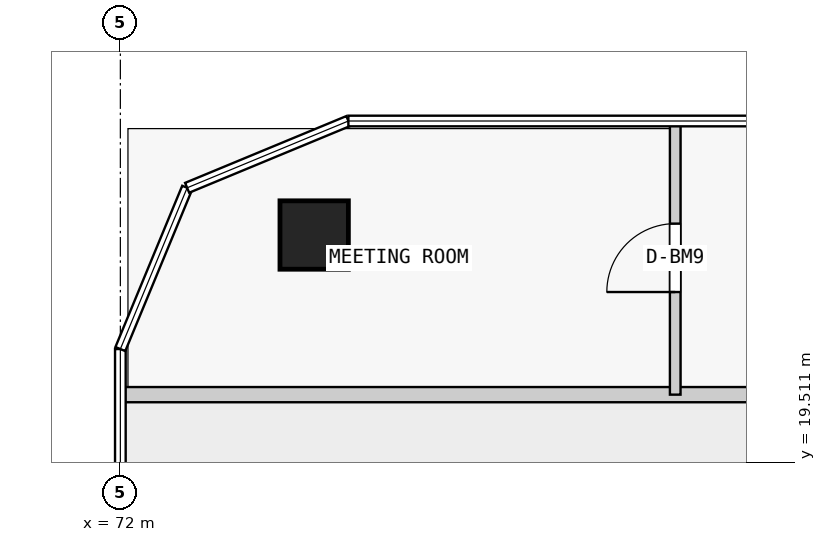
"""IFC4 building model, lengths in metres.
Left out: names, types, materials, properties, quantities, classifications, styles, units other than length and angle.
Written with IfcOpenShell. Run it as: python <this file> out.ifc"""

import sys

from ifc_helpers import new_model, si_unit, direction, frame, frame_2d, origin, origin_2d, place, context, subcontext, project, spatial, rectangle, extrude, element, fill, save


model = new_model("IFC4")
c1 = context("Model", 3, precision=1e-05, world=origin(), true_north=direction((0.0, 1.0)))
c2 = subcontext(c1, "Body", "Model", "MODEL_VIEW")
j1 = project(units=[si_unit("LENGTHUNIT", "METRE"), si_unit("PLANEANGLEUNIT", "RADIAN")], contexts=[c1])
p1 = place(None, origin())
s1 = spatial("IfcSite", under=j1, at=p1, CompositionType="ELEMENT")
p2 = place(p1, origin())
s2 = spatial("IfcBuilding", under=s1, at=p2, CompositionType="ELEMENT")
p3 = place(p2, frame((0.0, 0.0, 88.8)))
s3 = spatial("IfcBuildingStorey", under=s2, at=p3, CompositionType="ELEMENT", Elevation=88.8)
p4 = place(p3, frame((74.55, 22.5, 0.0), z_axis=(0.0, 0.0, 1.0), x_axis=(1.0, 0.0, 0.0)))
e1 = element("IfcColumn", 1, at=p4, inside=s3, PredefinedType="COLUMN", context=c2, shape_type="SweptSolid", body=[
    extrude(rectangle(XDim=0.9, YDim=0.9, at=origin_2d()), origin(), (0.0, 0.0, 1.0), 3.5),
])
p5 = place(p3, frame((72.0, 20.4, 0.0), z_axis=(0.0, 0.0, 1.0), x_axis=(1.0, 0.0, 0.0)))
e2 = element("IfcWall", 2, at=p5, inside=s3, PredefinedType="PARTITIONING", context=c2, shape_type="SweptSolid", body=[
    extrude(rectangle(XDim=20.0, YDim=0.2, at=frame_2d((10.0, 0.0))), origin(), (0.0, 0.0, 1.0), 3.25),
])
p6 = place(p3, frame((79.3, 20.4, 0.0), z_axis=(0.0, 0.0, 1.0), x_axis=(0.0, 1.0, 0.0)))
e3 = element("IfcWall", 3, at=p6, inside=s3, PredefinedType="PARTITIONING", context=c2, shape_type="SweptSolid", body=[
    extrude(rectangle(XDim=3.6, YDim=0.14, at=frame_2d((1.8, 0.0))), origin(), (0.0, 0.0, 1.0), 3.25),
])
p7 = place(p6, frame((1.35, 0.0, 0.0)))
e4 = element("IfcOpeningElement", 4, at=p7, cuts=e3, PredefinedType="OPENING", context=c2, shape_type="SweptSolid", body=[
    extrude(rectangle(XDim=0.9, YDim=2.4, at=frame_2d((0.45, 1.2))), frame((0.0, 0.08, 0.0), z_axis=(0.0, -1.0, 0.0), x_axis=(1.0, 0.0, 0.0)), (0.0, 0.0, 1.0), 0.16),
])
p8 = place(p7, origin())
e5 = element("IfcDoor", 5, at=p8, inside=s3, OperationType="SINGLE_SWING_LEFT", PredefinedType="DOOR", context=c2, shape_type="SweptSolid", body=[
    extrude(rectangle(XDim=0.9, YDim=2.4, at=frame_2d((0.45, 1.2))), frame((0.0, 0.025, 0.0), z_axis=(0.0, -1.0, 0.0), x_axis=(1.0, 0.0, 0.0)), (0.0, 0.0, 1.0), 0.05),
])
fill(e4, e5)
save(model, sys.argv[1])
